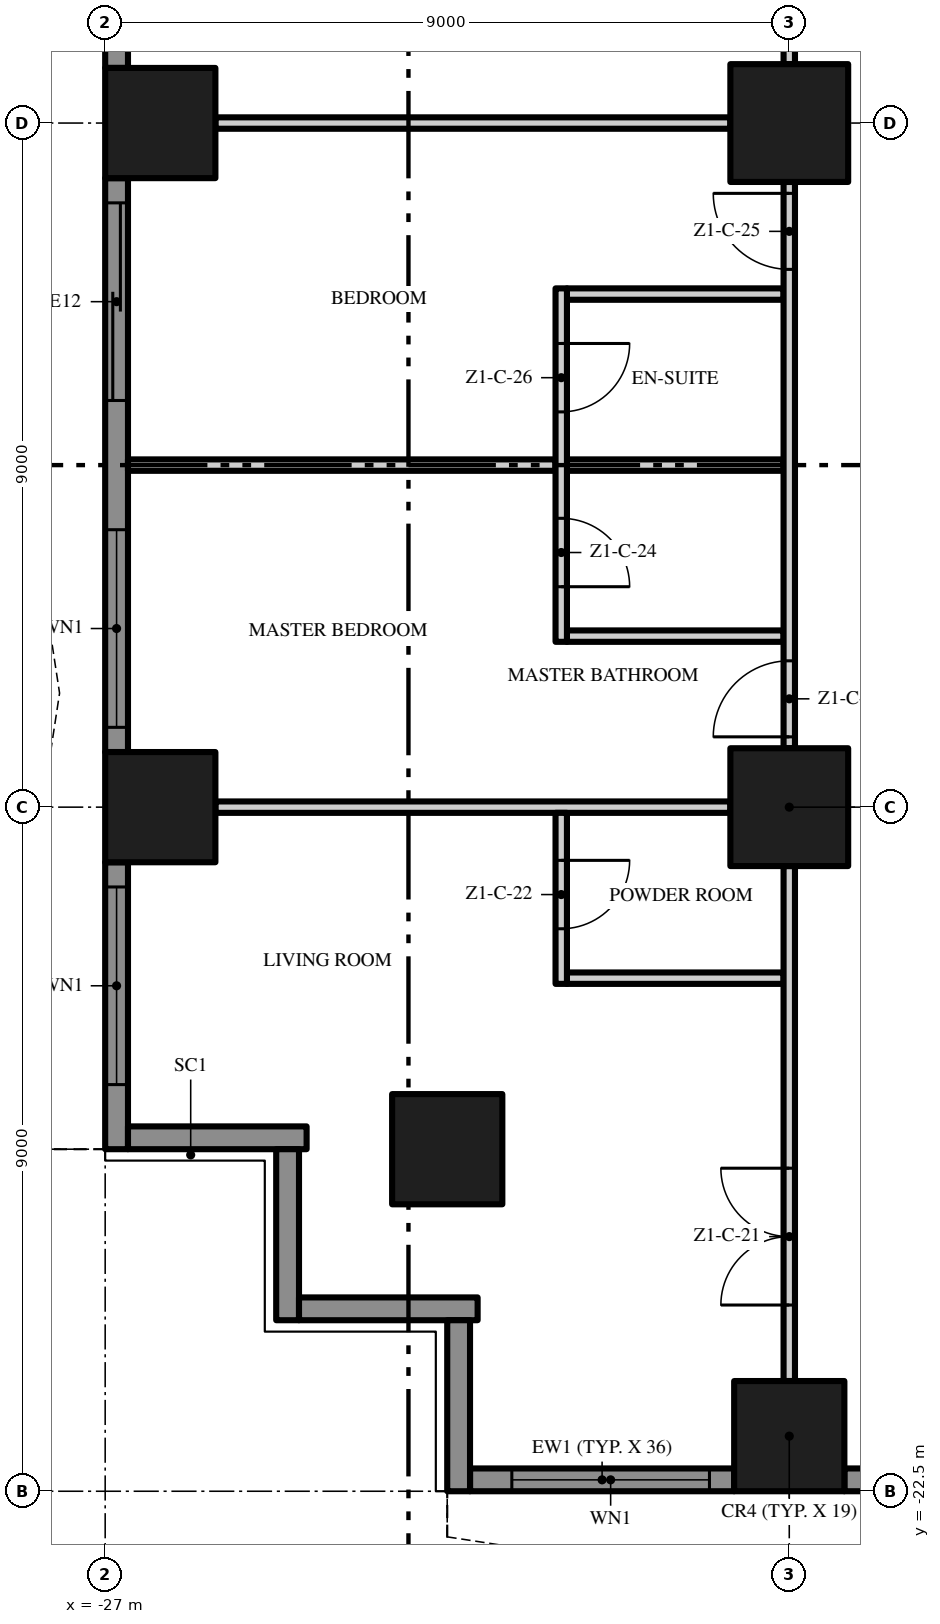
"""IFC4 building model, lengths in metres.
Left out: names, types, materials, properties, quantities, classifications, styles, units other than length and angle.
Written with IfcOpenShell. Run it as: python <this file> out.ifc"""

import sys

from ifc_helpers import new_model, si_unit, direction, frame, frame_2d, origin, origin_2d, place, context, subcontext, project, spatial, polyline, rectangle, outline, extrude, element, fill, save


model = new_model("IFC4")
c1 = context("Model", 3, precision=1e-05, world=origin(), true_north=direction((0.0, 1.0)))
c2 = subcontext(c1, "Body", "Model", "MODEL_VIEW")
j1 = project(units=[si_unit("LENGTHUNIT", "METRE"), si_unit("PLANEANGLEUNIT", "RADIAN")], contexts=[c1])
p1 = place(None, origin())
s1 = spatial("IfcSite", under=j1, at=p1, CompositionType="ELEMENT")
p2 = place(p1, origin())
s2 = spatial("IfcBuilding", under=s1, at=p2, CompositionType="ELEMENT")
p3 = place(p2, frame((0.0, 0.0, 37.8)))
s3 = spatial("IfcBuildingStorey", under=s2, at=p3, CompositionType="ELEMENT", Elevation=37.8)
p4 = place(p3, frame((-18.0, -13.5, 0.0), z_axis=(0.0, 0.0, 1.0), x_axis=(1.0, 0.0, 0.0)))
e1 = element("IfcColumn", 1, at=p4, inside=s3, PredefinedType="COLUMN", context=c2, shape_type="SweptSolid", body=[
    extrude(rectangle(XDim=1.55, YDim=1.55, at=origin_2d()), origin(), (0.0, 0.0, 1.0), 3.5),
])
p5 = place(p3, frame((-18.0, -21.775, 0.0), z_axis=(0.0, 0.0, 1.0), x_axis=(1.0, 0.0, 0.0)))
e2 = element("IfcColumn", 2, at=p5, inside=s3, PredefinedType="COLUMN", context=c2, shape_type="SweptSolid", body=[
    extrude(rectangle(XDim=1.45, YDim=1.45, at=origin_2d()), origin(), (0.0, 0.0, 1.0), 3.5),
])
p6 = place(p3, frame((-18.0, -4.5, 0.0), z_axis=(0.0, 0.0, 1.0), x_axis=(1.0, 0.0, 0.0)))
e3 = element("IfcColumn", 3, at=p6, inside=s3, PredefinedType="COLUMN", context=c2, shape_type="SweptSolid", body=[
    extrude(rectangle(XDim=1.55, YDim=1.55, at=origin_2d()), origin(), (0.0, 0.0, 1.0), 3.5),
])
for number, where, z_axis, x_axis in (
    (4, (-26.275, -13.5, 0.0), (0.0, 0.0, 1.0), (1.0, 0.0, 0.0)),
    (5, (-22.5, -18.0, 0.0), (0.0, 0.0, 1.0), (1.0, 0.0, 0.0)),
    (6, (-26.275, -4.5, 0.0), (0.0, 0.0, 1.0), (1.0, 0.0, 0.0)),
):
    element("IfcColumn", number, at=place(p3, frame(where, z_axis=z_axis, x_axis=x_axis)), inside=s3, PredefinedType="COLUMN", context=c2, shape_type="SweptSolid", body=[
        extrude(rectangle(XDim=1.45, YDim=1.45, at=origin_2d()), origin(), (0.0, 0.0, 1.0), 3.5),
    ])
p7 = place(p3, frame((-18.725, -22.35, 0.0), z_axis=(0.0, 0.0, 1.0), x_axis=(-1.0, 0.0, 0.0)))
e7 = element("IfcWall", 7, at=p7, inside=s3, PredefinedType="SOLIDWALL", context=c2, shape_type="SweptSolid", body=[
    extrude(rectangle(XDim=3.475, YDim=0.3, at=frame_2d((1.738, 0.0))), origin(), (0.0, 0.0, 1.0), 3.5),
])
p8 = place(p7, frame((0.325, 0.0, 0.45)))
e8 = element("IfcOpeningElement", 8, at=p8, cuts=e7, PredefinedType="OPENING", context=c2, shape_type="SweptSolid", body=[
    extrude(rectangle(XDim=2.6, YDim=2.65, at=frame_2d((1.3, 1.325))), frame((0.0, 0.16, 0.0), z_axis=(0.0, -1.0, 0.0), x_axis=(1.0, 0.0, 0.0)), (0.0, 0.0, 1.0), 0.32),
])
p9 = place(p3, frame((-9.725, -22.35, 0.0), z_axis=(0.0, 0.0, 1.0), x_axis=(-1.0, 0.0, 0.0)))
e9 = element("IfcWall", 9, at=p9, inside=s3, PredefinedType="SOLIDWALL", context=c2, shape_type="SweptSolid", body=[
    extrude(rectangle(XDim=7.55, YDim=0.3, at=frame_2d((3.775, 0.0))), origin(), (0.0, 0.0, 1.0), 3.5),
])
p10 = place(p9, frame((4.625, 0.0, 0.0)))
e10 = element("IfcOpeningElement", 10, at=p10, cuts=e9, PredefinedType="OPENING", context=c2, shape_type="SweptSolid", body=[
    extrude(rectangle(XDim=2.6, YDim=2.4, at=frame_2d((1.3, 1.2))), frame((0.0, 0.16, 0.0), z_axis=(0.0, -1.0, 0.0), x_axis=(1.0, 0.0, 0.0)), (0.0, 0.0, 1.0), 0.32),
])
p11 = place(p9, frame((0.325, 0.0, 0.45)))
e11 = element("IfcOpeningElement", 11, at=p11, cuts=e9, PredefinedType="OPENING", context=c2, shape_type="SweptSolid", body=[
    extrude(rectangle(XDim=2.6, YDim=2.65, at=frame_2d((1.3, 1.325))), frame((0.0, 0.16, 0.0), z_axis=(0.0, -1.0, 0.0), x_axis=(1.0, 0.0, 0.0)), (0.0, 0.0, 1.0), 0.32),
])
p12 = place(p3, frame((-26.85, -3.775, 0.0), z_axis=(0.0, 0.0, 1.0), x_axis=(0.0, 1.0, 0.0)))
e12 = element("IfcWall", 12, at=p12, inside=s3, PredefinedType="SOLIDWALL", context=c2, shape_type="SweptSolid", body=[
    extrude(rectangle(XDim=7.55, YDim=0.3, at=frame_2d((3.775, 0.0))), origin(), (0.0, 0.0, 1.0), 3.5),
])
p13 = place(p12, frame((4.625, 0.0, 0.45)))
e13 = element("IfcOpeningElement", 13, at=p13, cuts=e12, PredefinedType="OPENING", context=c2, shape_type="SweptSolid", body=[
    extrude(rectangle(XDim=2.6, YDim=2.65, at=frame_2d((1.3, 1.325))), frame((0.0, 0.16, 0.0), z_axis=(0.0, -1.0, 0.0), x_axis=(1.0, 0.0, 0.0)), (0.0, 0.0, 1.0), 0.32),
])
p14 = place(p12, frame((0.325, 0.0, 0.0)))
e14 = element("IfcOpeningElement", 14, at=p14, cuts=e12, PredefinedType="OPENING", context=c2, shape_type="SweptSolid", body=[
    extrude(rectangle(XDim=2.6, YDim=2.4, at=frame_2d((1.3, 1.2))), frame((0.0, 0.16, 0.0), z_axis=(0.0, -1.0, 0.0), x_axis=(1.0, 0.0, 0.0)), (0.0, 0.0, 1.0), 0.32),
])
p15 = place(p3, frame((-26.85, -12.775, 0.0), z_axis=(0.0, 0.0, 1.0), x_axis=(0.0, 1.0, 0.0)))
e15 = element("IfcWall", 15, at=p15, inside=s3, PredefinedType="SOLIDWALL", context=c2, shape_type="SweptSolid", body=[
    extrude(rectangle(XDim=7.55, YDim=0.3, at=frame_2d((3.775, 0.0))), origin(), (0.0, 0.0, 1.0), 3.5),
])
p16 = place(p15, frame((4.625, 0.0, 0.0)))
e16 = element("IfcOpeningElement", 16, at=p16, cuts=e15, PredefinedType="OPENING", context=c2, shape_type="SweptSolid", body=[
    extrude(rectangle(XDim=2.6, YDim=2.4, at=frame_2d((1.3, 1.2))), frame((0.0, 0.16, 0.0), z_axis=(0.0, -1.0, 0.0), x_axis=(1.0, 0.0, 0.0)), (0.0, 0.0, 1.0), 0.32),
])
p17 = place(p15, frame((0.325, 0.0, 0.45)))
e17 = element("IfcOpeningElement", 17, at=p17, cuts=e15, PredefinedType="OPENING", context=c2, shape_type="SweptSolid", body=[
    extrude(rectangle(XDim=2.6, YDim=2.65, at=frame_2d((1.3, 1.325))), frame((0.0, 0.16, 0.0), z_axis=(0.0, -1.0, 0.0), x_axis=(1.0, 0.0, 0.0)), (0.0, 0.0, 1.0), 0.32),
])
p18 = place(p3, frame((-26.85, -18.0, 0.0), z_axis=(0.0, 0.0, 1.0), x_axis=(0.0, 1.0, 0.0)))
e18 = element("IfcWall", 18, at=p18, inside=s3, PredefinedType="SOLIDWALL", context=c2, shape_type="SweptSolid", body=[
    extrude(rectangle(XDim=3.775, YDim=0.3, at=frame_2d((1.887, 0.0))), origin(), (0.0, 0.0, 1.0), 3.5),
])
p19 = place(p18, frame((0.85, 0.0, 0.45)))
e19 = element("IfcOpeningElement", 19, at=p19, cuts=e18, PredefinedType="OPENING", context=c2, shape_type="SweptSolid", body=[
    extrude(rectangle(XDim=2.6, YDim=2.65, at=frame_2d((1.3, 1.325))), frame((0.0, 0.16, 0.0), z_axis=(0.0, -1.0, 0.0), x_axis=(1.0, 0.0, 0.0)), (0.0, 0.0, 1.0), 0.32),
])
p20 = place(p3, frame((-24.35, -17.85, 0.0), z_axis=(0.0, 0.0, 1.0), x_axis=(-1.0, 0.0, 0.0)))
e20 = element("IfcWall", 20, at=p20, inside=s3, PredefinedType="SOLIDWALL", context=c2, shape_type="SweptSolid", body=[
    extrude(rectangle(XDim=2.35, YDim=0.3, at=frame_2d((1.175, 0.0))), origin(), (0.0, 0.0, 1.0), 3.5),
])
p21 = place(p3, frame((-24.6, -20.25, 0.0), z_axis=(0.0, 0.0, 1.0), x_axis=(0.0, 1.0, 0.0)))
e21 = element("IfcWall", 21, at=p21, inside=s3, PredefinedType="SOLIDWALL", context=c2, shape_type="SweptSolid", body=[
    extrude(rectangle(XDim=2.25, YDim=0.3, at=frame_2d((1.125, 0.0))), origin(), (0.0, 0.0, 1.0), 3.5),
])
p22 = place(p3, frame((-22.1, -20.1, 0.0), z_axis=(0.0, 0.0, 1.0), x_axis=(-1.0, 0.0, 0.0)))
e22 = element("IfcWall", 22, at=p22, inside=s3, PredefinedType="SOLIDWALL", context=c2, shape_type="SweptSolid", body=[
    extrude(rectangle(XDim=2.35, YDim=0.3, at=frame_2d((1.175, 0.0))), origin(), (0.0, 0.0, 1.0), 3.5),
])
p23 = place(p3, frame((-22.35, -22.5, 0.0), z_axis=(0.0, 0.0, 1.0), x_axis=(0.0, 1.0, 0.0)))
e23 = element("IfcWall", 23, at=p23, inside=s3, PredefinedType="SOLIDWALL", context=c2, shape_type="SweptSolid", body=[
    extrude(rectangle(XDim=2.25, YDim=0.3, at=frame_2d((1.125, 0.0))), origin(), (0.0, 0.0, 1.0), 3.5),
])
p24 = place(p3, origin())
e24 = element("IfcWall", 24, at=p24, inside=s3, PredefinedType="USERDEFINED", context=c2, shape_type="SweptSolid", body=[
    extrude(outline(polyline([(-22.5, -23.1), (-21.0, -23.329), (-19.5, -23.929), (-18.0, -24.671), (-16.5, -25.271), (-15.0, -25.5), (-13.5, -25.271), (-12.0, -24.671), (-10.5, -23.929), (-9.0, -23.329), (-7.5, -23.1), (-6.0, -23.329), (-4.5, -23.929), (-3.0, -24.671), (-1.5, -25.271), (0.0, -25.5), (1.5, -25.271), (3.0, -24.671), (4.5, -23.929), (6.0, -23.329), (7.5, -23.1), (9.0, -23.329), (10.5, -23.929), (12.0, -24.671), (13.5, -25.271), (15.0, -25.5), (16.5, -25.271), (18.0, -24.671), (19.5, -23.929), (21.0, -23.329), (22.5, -23.1), (22.462, -22.853), (20.934, -23.086), (19.398, -23.701), (17.898, -24.442), (16.434, -25.028), (15.0, -25.247), (13.566, -25.028), (12.102, -24.442), (10.602, -23.701), (9.066, -23.086), (7.5, -22.847), (5.934, -23.086), (4.398, -23.701), (2.898, -24.442), (1.434, -25.028), (0.0, -25.247), (-1.434, -25.028), (-2.898, -24.442), (-4.398, -23.701), (-5.934, -23.086), (-7.5, -22.847), (-9.066, -23.086), (-10.602, -23.701), (-12.102, -24.442), (-13.566, -25.028), (-15.0, -25.247), (-16.434, -25.028), (-17.898, -24.442), (-19.398, -23.701), (-20.934, -23.086), (-22.462, -22.853), (-22.5, -23.1)])), origin(), (0.0, 0.0, 1.0), 0.9),
])
p25 = place(p3, origin())
e25 = element("IfcWall", 25, at=p25, inside=s3, PredefinedType="USERDEFINED", context=c2, shape_type="SweptSolid", body=[
    extrude(outline(polyline([(-27.6, 18.0), (-27.829, 16.5), (-28.429, 15.0), (-29.171, 13.5), (-29.771, 12.0), (-30.0, 10.5), (-29.771, 9.0), (-29.171, 7.5), (-28.429, 6.0), (-27.829, 4.5), (-27.6, 3.0), (-27.829, 1.5), (-28.429, 0.0), (-29.171, -1.5), (-29.771, -3.0), (-30.0, -4.5), (-29.771, -6.0), (-29.171, -7.5), (-28.429, -9.0), (-27.829, -10.5), (-27.6, -12.0), (-27.829, -13.5), (-28.429, -15.0), (-29.171, -16.5), (-29.771, -18.0), (-29.539, -18.093), (-28.942, -16.602), (-28.201, -15.102), (-27.586, -13.566), (-27.347, -12.0), (-27.586, -10.434), (-28.201, -8.898), (-28.942, -7.398), (-29.528, -5.934), (-29.747, -4.5), (-29.528, -3.066), (-28.942, -1.602), (-28.201, -0.102), (-27.586, 1.434), (-27.347, 3.0), (-27.586, 4.566), (-28.201, 6.102), (-28.942, 7.602), (-29.528, 9.066), (-29.747, 10.5), (-29.528, 11.934), (-28.942, 13.398), (-28.201, 14.898), (-27.586, 16.434), (-27.353, 17.962), (-27.6, 18.0)])), origin(), (0.0, 0.0, 1.0), 0.9),
])
p26 = place(p3, frame((-20.925, -15.75, 0.0), z_axis=(0.0, 0.0, 1.0), x_axis=(1.0, 0.0, 0.0)))
e26 = element("IfcWall", 26, at=p26, inside=s3, PredefinedType="PARTITIONING", context=c2, shape_type="SweptSolid", body=[
    extrude(rectangle(XDim=2.85, YDim=0.15, at=frame_2d((1.425, 0.0))), origin(), (0.0, 0.0, 1.0), 3.5),
])
p27 = place(p3, frame((-25.55, -13.5, 0.0), z_axis=(0.0, 0.0, 1.0), x_axis=(1.0, 0.0, 0.0)))
e27 = element("IfcWall", 27, at=p27, inside=s3, PredefinedType="PARTITIONING", context=c2, shape_type="SweptSolid", body=[
    extrude(rectangle(XDim=6.775, YDim=0.15, at=frame_2d((3.388, 0.0))), origin(), (0.0, 0.0, 1.0), 3.5),
])
p28 = place(p3, frame((-20.925, -11.25, 0.0), z_axis=(0.0, 0.0, 1.0), x_axis=(1.0, 0.0, 0.0)))
e28 = element("IfcWall", 28, at=p28, inside=s3, PredefinedType="PARTITIONING", context=c2, shape_type="SweptSolid", body=[
    extrude(rectangle(XDim=2.85, YDim=0.15, at=frame_2d((1.425, 0.0))), origin(), (0.0, 0.0, 1.0), 3.5),
])
p29 = place(p3, frame((-26.7, -9.0, 0.0), z_axis=(0.0, 0.0, 1.0), x_axis=(1.0, 0.0, 0.0)))
e29 = element("IfcWall", 29, at=p29, inside=s3, PredefinedType="PARTITIONING", context=c2, shape_type="SweptSolid", body=[
    extrude(rectangle(XDim=5.625, YDim=0.15, at=frame_2d((2.812, 0.0))), origin(), (0.0, 0.0, 1.0), 3.5),
])
for number, where, z_axis, x_axis in (
    (30, (-20.925, -9.0, 0.0), (0.0, 0.0, 1.0), (1.0, 0.0, 0.0)),
    (31, (-20.925, -6.75, 0.0), (0.0, 0.0, 1.0), (1.0, 0.0, 0.0)),
):
    element("IfcWall", number, at=place(p3, frame(where, z_axis=z_axis, x_axis=x_axis)), inside=s3, PredefinedType="PARTITIONING", context=c2, shape_type="SweptSolid", body=[
        extrude(rectangle(XDim=2.85, YDim=0.15, at=frame_2d((1.425, 0.0))), origin(), (0.0, 0.0, 1.0), 3.5),
    ])
p30 = place(p3, frame((-25.55, -4.5, 0.0), z_axis=(0.0, 0.0, 1.0), x_axis=(1.0, 0.0, 0.0)))
e32 = element("IfcWall", 32, at=p30, inside=s3, PredefinedType="PARTITIONING", context=c2, shape_type="SweptSolid", body=[
    extrude(rectangle(XDim=6.775, YDim=0.15, at=frame_2d((3.388, 0.0))), origin(), (0.0, 0.0, 1.0), 3.5),
])
p31 = place(p3, frame((-21.0, -13.575, 0.0), z_axis=(0.0, 0.0, 1.0), x_axis=(0.0, -1.0, 0.0)))
e33 = element("IfcWall", 33, at=p31, inside=s3, PredefinedType="PARTITIONING", context=c2, shape_type="SweptSolid", body=[
    extrude(rectangle(XDim=2.25, YDim=0.15, at=frame_2d((1.125, 0.0))), origin(), (0.0, 0.0, 1.0), 3.5),
])
p32 = place(p31, frame((0.625, 0.0, 0.0)))
e34 = element("IfcOpeningElement", 34, at=p32, cuts=e33, PredefinedType="OPENING", context=c2, shape_type="SweptSolid", body=[
    extrude(rectangle(XDim=0.9, YDim=2.1, at=frame_2d((0.45, 1.05))), frame((0.0, 0.085, 0.0), z_axis=(0.0, -1.0, 0.0), x_axis=(1.0, 0.0, 0.0)), (0.0, 0.0, 1.0), 0.17),
])
p33 = place(p3, frame((-21.0, -6.675, 0.0), z_axis=(0.0, 0.0, 1.0), x_axis=(0.0, -1.0, 0.0)))
e35 = element("IfcWall", 35, at=p33, inside=s3, PredefinedType="PARTITIONING", context=c2, shape_type="SweptSolid", body=[
    extrude(rectangle(XDim=4.65, YDim=0.15, at=frame_2d((2.325, 0.0))), origin(), (0.0, 0.0, 1.0), 3.5),
])
p34 = place(p33, frame((3.025, 0.0, 0.0)))
e36 = element("IfcOpeningElement", 36, at=p34, cuts=e35, PredefinedType="OPENING", context=c2, shape_type="SweptSolid", body=[
    extrude(rectangle(XDim=0.9, YDim=2.1, at=frame_2d((0.45, 1.05))), frame((0.0, 0.085, 0.0), z_axis=(0.0, -1.0, 0.0), x_axis=(1.0, 0.0, 0.0)), (0.0, 0.0, 1.0), 0.17),
])
p35 = place(p33, frame((0.725, 0.0, 0.0)))
e37 = element("IfcOpeningElement", 37, at=p35, cuts=e35, PredefinedType="OPENING", context=c2, shape_type="SweptSolid", body=[
    extrude(rectangle(XDim=0.9, YDim=2.1, at=frame_2d((0.45, 1.05))), frame((0.0, 0.085, 0.0), z_axis=(0.0, -1.0, 0.0), x_axis=(1.0, 0.0, 0.0)), (0.0, 0.0, 1.0), 0.17),
])
p36 = place(p3, frame((-18.0, -21.05, 0.0), z_axis=(0.0, 0.0, 1.0), x_axis=(0.0, 1.0, 0.0)))
e38 = element("IfcWall", 38, at=p36, inside=s3, PredefinedType="PARTITIONING", context=c2, shape_type="SweptSolid", body=[
    extrude(rectangle(XDim=6.775, YDim=0.15, at=frame_2d((3.388, 0.0))), origin(), (0.0, 0.0, 1.0), 3.5),
])
p37 = place(p36, frame((1.0, 0.0, 0.0)))
e39 = element("IfcOpeningElement", 39, at=p37, cuts=e38, PredefinedType="OPENING", context=c2, shape_type="SweptSolid", body=[
    extrude(rectangle(XDim=1.8, YDim=2.4, at=frame_2d((0.9, 1.2))), frame((0.0, 0.085, 0.0), z_axis=(0.0, -1.0, 0.0), x_axis=(1.0, 0.0, 0.0)), (0.0, 0.0, 1.0), 0.17),
])
p38 = place(p3, frame((-18.0, -12.725, 0.0), z_axis=(0.0, 0.0, 1.0), x_axis=(0.0, 1.0, 0.0)))
e40 = element("IfcWall", 40, at=p38, inside=s3, PredefinedType="PARTITIONING", context=c2, shape_type="SweptSolid", body=[
    extrude(rectangle(XDim=7.45, YDim=0.15, at=frame_2d((3.725, 0.0))), origin(), (0.0, 0.0, 1.0), 3.5),
])
p39 = place(p38, frame((0.15, 0.0, 0.0)))
e41 = element("IfcOpeningElement", 41, at=p39, cuts=e40, PredefinedType="OPENING", context=c2, shape_type="SweptSolid", body=[
    extrude(rectangle(XDim=1.0, YDim=2.4, at=frame_2d((0.5, 1.2))), frame((0.0, 0.085, 0.0), z_axis=(0.0, -1.0, 0.0), x_axis=(1.0, 0.0, 0.0)), (0.0, 0.0, 1.0), 0.17),
])
p40 = place(p38, frame((6.3, 0.0, 0.0)))
e42 = element("IfcOpeningElement", 42, at=p40, cuts=e40, PredefinedType="OPENING", context=c2, shape_type="SweptSolid", body=[
    extrude(rectangle(XDim=1.0, YDim=2.4, at=frame_2d((0.5, 1.2))), frame((0.0, 0.085, 0.0), z_axis=(0.0, -1.0, 0.0), x_axis=(1.0, 0.0, 0.0)), (0.0, 0.0, 1.0), 0.17),
])
p41 = place(p3, frame((-18.0, -3.725, 0.0), z_axis=(0.0, 0.0, 1.0), x_axis=(0.0, 1.0, 0.0)))
e43 = element("IfcWall", 43, at=p41, inside=s3, PredefinedType="PARTITIONING", context=c2, shape_type="SweptSolid", body=[
    extrude(rectangle(XDim=3.625, YDim=0.15, at=frame_2d((1.812, 0.0))), origin(), (0.0, 0.0, 1.0), 3.5),
])
p42 = place(p41, frame((1.0, 0.0, 0.0)))
e44 = element("IfcOpeningElement", 44, at=p42, cuts=e43, PredefinedType="OPENING", context=c2, shape_type="SweptSolid", body=[
    extrude(rectangle(XDim=1.0, YDim=2.4, at=frame_2d((0.5, 1.2))), frame((0.0, 0.085, 0.0), z_axis=(0.0, -1.0, 0.0), x_axis=(1.0, 0.0, 0.0)), (0.0, 0.0, 1.0), 0.17),
])
p43 = place(p8, origin())
e45 = element("IfcWindow", 45, at=p43, inside=s3, PartitioningType="SINGLE_PANEL", PredefinedType="WINDOW", context=c2, shape_type="SweptSolid", body=[
    extrude(rectangle(XDim=2.6, YDim=2.65, at=frame_2d((1.3, 1.325))), frame((0.0, 0.03, 0.0), z_axis=(0.0, -1.0, 0.0), x_axis=(1.0, 0.0, 0.0)), (0.0, 0.0, 1.0), 0.06),
])
fill(e8, e45)
p44 = place(p16, origin())
e46 = element("IfcDoor", 46, at=p44, inside=s3, OperationType="SINGLE_SWING_LEFT", PredefinedType="DOOR", context=c2, shape_type="SweptSolid", body=[
    extrude(rectangle(XDim=2.6, YDim=2.4, at=frame_2d((1.3, 1.2))), frame((0.0, 0.025, 0.0), z_axis=(0.0, -1.0, 0.0), x_axis=(1.0, 0.0, 0.0)), (0.0, 0.0, 1.0), 0.05),
])
fill(e16, e46)
p45 = place(p17, origin())
e47 = element("IfcWindow", 47, at=p45, inside=s3, PartitioningType="SINGLE_PANEL", PredefinedType="WINDOW", context=c2, shape_type="SweptSolid", body=[
    extrude(rectangle(XDim=2.6, YDim=2.65, at=frame_2d((1.3, 1.325))), frame((0.0, 0.03, 0.0), z_axis=(0.0, -1.0, 0.0), x_axis=(1.0, 0.0, 0.0)), (0.0, 0.0, 1.0), 0.06),
])
fill(e17, e47)
p46 = place(p19, origin())
e48 = element("IfcWindow", 48, at=p46, inside=s3, PartitioningType="SINGLE_PANEL", PredefinedType="WINDOW", context=c2, shape_type="SweptSolid", body=[
    extrude(rectangle(XDim=2.6, YDim=2.65, at=frame_2d((1.3, 1.325))), frame((0.0, 0.03, 0.0), z_axis=(0.0, -1.0, 0.0), x_axis=(1.0, 0.0, 0.0)), (0.0, 0.0, 1.0), 0.06),
])
fill(e19, e48)
p47 = place(p37, origin())
e49 = element("IfcDoor", 49, at=p47, inside=s3, OperationType="DOUBLE_DOOR_SINGLE_SWING", PredefinedType="DOOR", context=c2, shape_type="SweptSolid", body=[
    extrude(rectangle(XDim=1.8, YDim=2.4, at=frame_2d((0.9, 1.2))), frame((0.0, 0.025, 0.0), z_axis=(0.0, -1.0, 0.0), x_axis=(1.0, 0.0, 0.0)), (0.0, 0.0, 1.0), 0.05),
])
fill(e39, e49)
p48 = place(p32, origin())
e50 = element("IfcDoor", 50, at=p48, inside=s3, OperationType="SINGLE_SWING_LEFT", PredefinedType="DOOR", context=c2, shape_type="SweptSolid", body=[
    extrude(rectangle(XDim=0.9, YDim=2.1, at=frame_2d((0.45, 1.05))), frame((0.0, 0.025, 0.0), z_axis=(0.0, -1.0, 0.0), x_axis=(1.0, 0.0, 0.0)), (0.0, 0.0, 1.0), 0.05),
])
fill(e34, e50)
p49 = place(p39, origin())
e51 = element("IfcDoor", 51, at=p49, inside=s3, OperationType="SINGLE_SWING_LEFT", PredefinedType="DOOR", context=c2, shape_type="SweptSolid", body=[
    extrude(rectangle(XDim=1.0, YDim=2.4, at=frame_2d((0.5, 1.2))), frame((0.0, 0.025, 0.0), z_axis=(0.0, -1.0, 0.0), x_axis=(1.0, 0.0, 0.0)), (0.0, 0.0, 1.0), 0.05),
])
fill(e41, e51)
p50 = place(p34, origin())
e52 = element("IfcDoor", 52, at=p50, inside=s3, OperationType="SINGLE_SWING_RIGHT", PredefinedType="DOOR", context=c2, shape_type="SweptSolid", body=[
    extrude(rectangle(XDim=0.9, YDim=2.1, at=frame_2d((0.45, 1.05))), frame((0.0, 0.025, 0.0), z_axis=(0.0, -1.0, 0.0), x_axis=(1.0, 0.0, 0.0)), (0.0, 0.0, 1.0), 0.05),
])
fill(e36, e52)
p51 = place(p40, origin())
e53 = element("IfcDoor", 53, at=p51, inside=s3, OperationType="SINGLE_SWING_RIGHT", PredefinedType="DOOR", context=c2, shape_type="SweptSolid", body=[
    extrude(rectangle(XDim=1.0, YDim=2.4, at=frame_2d((0.5, 1.2))), frame((0.0, 0.025, 0.0), z_axis=(0.0, -1.0, 0.0), x_axis=(1.0, 0.0, 0.0)), (0.0, 0.0, 1.0), 0.05),
])
fill(e42, e53)
p52 = place(p35, origin())
e54 = element("IfcDoor", 54, at=p52, inside=s3, OperationType="SINGLE_SWING_LEFT", PredefinedType="DOOR", context=c2, shape_type="SweptSolid", body=[
    extrude(rectangle(XDim=0.9, YDim=2.1, at=frame_2d((0.45, 1.05))), frame((0.0, 0.025, 0.0), z_axis=(0.0, -1.0, 0.0), x_axis=(1.0, 0.0, 0.0)), (0.0, 0.0, 1.0), 0.05),
])
fill(e37, e54)
save(model, sys.argv[1])
